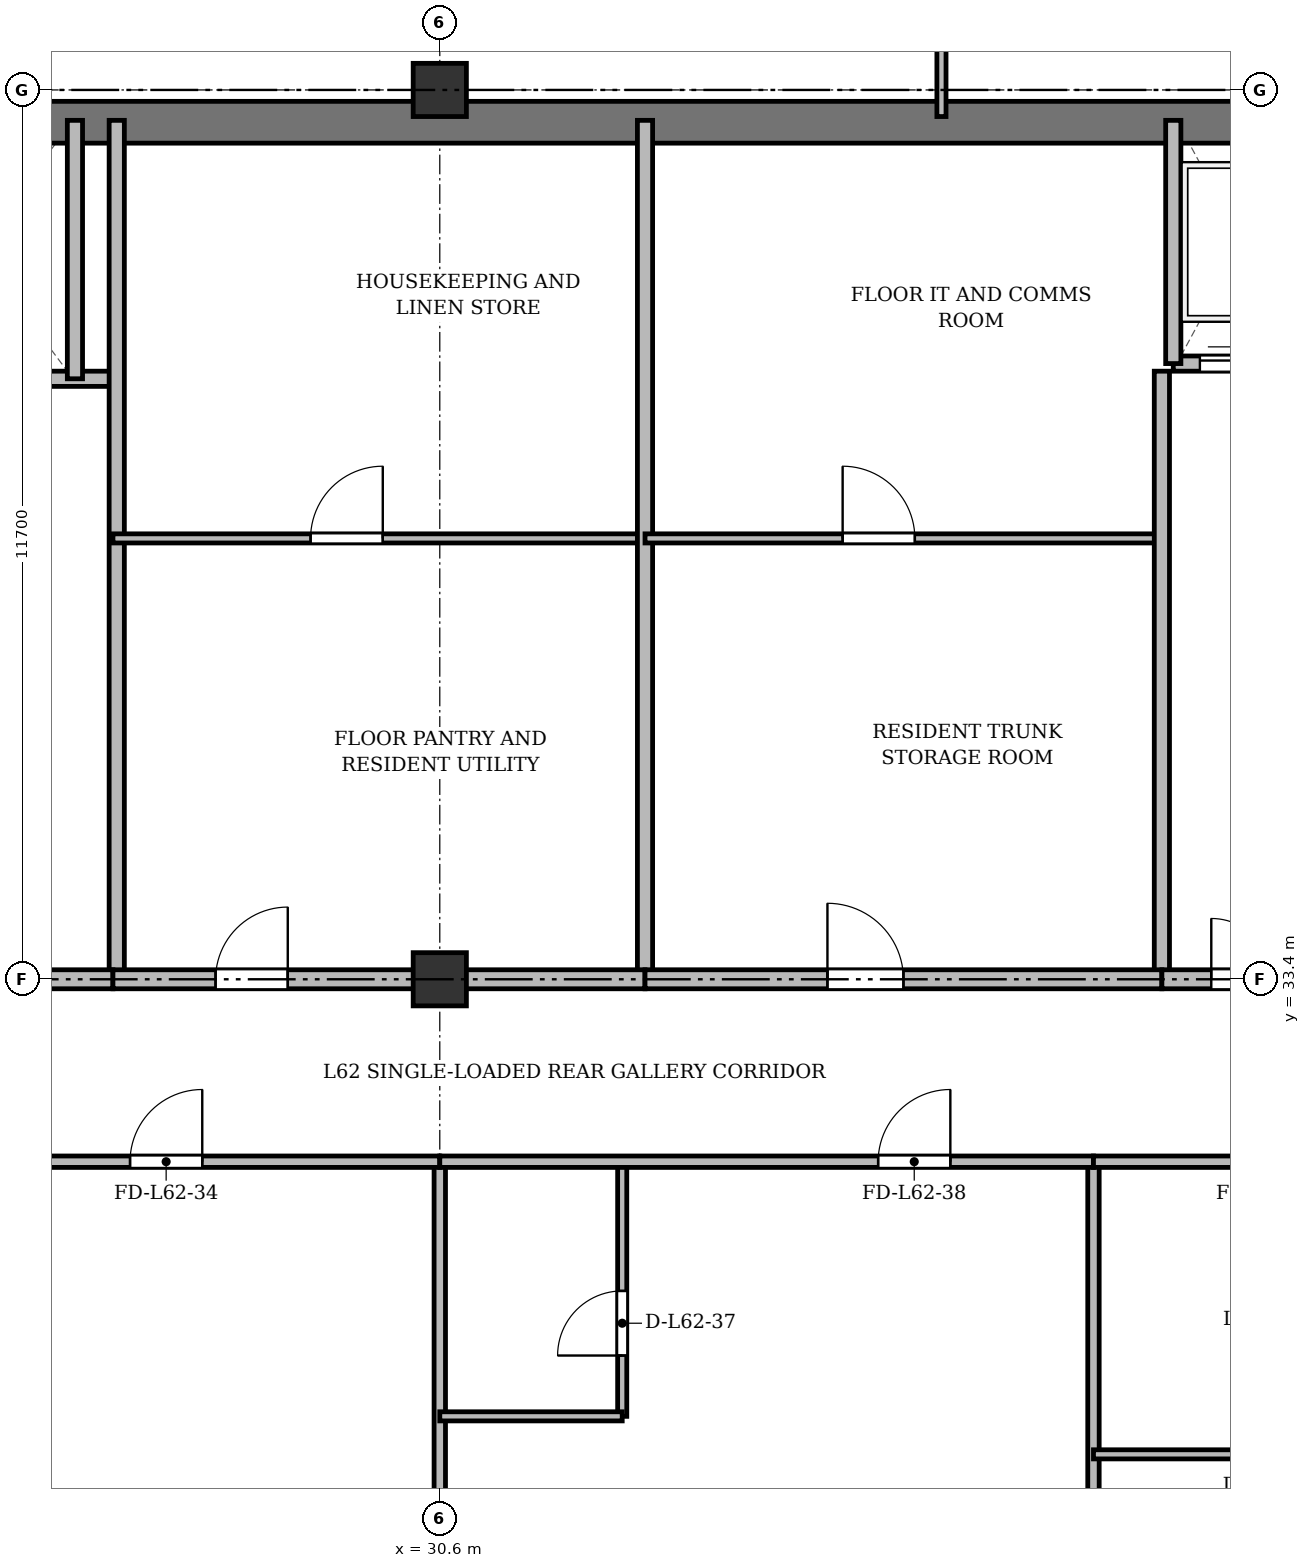
"""IFC4 building model, lengths in metres.
Left out: names, types, materials, properties, quantities, classifications, styles, units other than length and angle.
Written with IfcOpenShell. Run it as: python <this file> out.ifc"""

import sys

from ifc_helpers import new_model, si_unit, direction, frame, frame_2d, origin, origin_2d, place, context, subcontext, project, spatial, rectangle, extrude, source, transform, mapped, element, fill, save


model = new_model("IFC4")
c1 = context("Model", 3, precision=1e-05, world=origin(), true_north=direction((0.0, 1.0)))
c2 = subcontext(c1, "Body", "Model", "MODEL_VIEW")
j1 = project(units=[si_unit("LENGTHUNIT", "METRE"), si_unit("PLANEANGLEUNIT", "RADIAN")], contexts=[c1])
p1 = place(None, origin())
s1 = spatial("IfcSite", under=j1, at=p1, CompositionType="ELEMENT")
p2 = place(p1, origin())
s2 = spatial("IfcBuilding", under=s1, at=p2, CompositionType="ELEMENT")
p3 = place(p2, frame((0.0, 0.0, 237.3)))
s3 = spatial("IfcBuildingStorey", under=s2, at=p3, CompositionType="ELEMENT", Elevation=237.3)
m1 = source(origin(), c2, "Body", "SweptSolid", [
    extrude(rectangle(XDim=0.7, YDim=0.7, at=origin_2d()), origin(), (0.0, 0.0, 1.0), 3.6),
])
for number, where, z_axis, x_axis in (
    (1, (30.6, 33.4, 0.0), (0.0, 0.0, 1.0), (1.0, 0.0, 0.0)),
    (2, (30.6, 45.1, 0.0), (0.0, 0.0, 1.0), (1.0, 0.0, 0.0)),
):
    element("IfcColumn", number, at=place(p3, frame(where, z_axis=z_axis, x_axis=x_axis)), inside=s3, PredefinedType="COLUMN", context=c2, shape_type="MappedRepresentation", body=[
        mapped(m1, transform((0.0, 0.0, 0.0), x_axis=(1.0, 0.0, 0.0), y_axis=(0.0, 1.0, 0.0), z_axis=(0.0, 0.0, 1.0), scale=1.0)),
    ])
p4 = place(p3, frame((15.65, 44.675, 0.0), z_axis=(0.0, 0.0, 1.0), x_axis=(1.0, 0.0, 0.0)))
e3 = element("IfcWall", 3, at=p4, inside=s3, PredefinedType="SHEAR", context=c2, shape_type="SweptSolid", body=[
    extrude(rectangle(XDim=43.1, YDim=0.55, at=frame_2d((21.55, 0.0))), origin(), (0.0, 0.0, 1.0), 3.22),
])
p5 = place(p3, frame((19.55, 41.3, 0.0), z_axis=(0.0, 0.0, 1.0), x_axis=(1.0, 0.0, 0.0)))
e4 = element("IfcWall", 4, at=p5, inside=s3, PredefinedType="SOLIDWALL", context=c2, shape_type="SweptSolid", body=[
    extrude(rectangle(XDim=6.75, YDim=0.2, at=frame_2d((3.375, 0.0))), origin(), (0.0, 0.0, 1.0), 3.22),
])
p6 = place(p5, frame((1.7, 0.0, 0.0)))
e5 = element("IfcOpeningElement", 5, at=p6, cuts=e4, PredefinedType="OPENING", context=c2, shape_type="SweptSolid", body=[
    extrude(rectangle(XDim=1.1, YDim=2.15, at=frame_2d((0.55, 1.075))), frame((0.0, 0.11, 0.0), z_axis=(0.0, -1.0, 0.0), x_axis=(1.0, 0.0, 0.0)), (0.0, 0.0, 1.0), 0.22),
])
p7 = place(p5, frame((4.4, 0.0, 0.0)))
e6 = element("IfcOpeningElement", 6, at=p7, cuts=e4, PredefinedType="OPENING", context=c2, shape_type="SweptSolid", body=[
    extrude(rectangle(XDim=1.1, YDim=2.15, at=frame_2d((0.55, 1.075))), frame((0.0, 0.11, 0.0), z_axis=(0.0, -1.0, 0.0), x_axis=(1.0, 0.0, 0.0)), (0.0, 0.0, 1.0), 0.22),
])
p8 = place(p3, frame((25.8, 41.3, 0.0), z_axis=(0.0, 0.0, 1.0), x_axis=(0.0, 1.0, 0.0)))
e7 = element("IfcWall", 7, at=p8, inside=s3, PredefinedType="SOLIDWALL", context=c2, shape_type="SweptSolid", body=[
    extrude(rectangle(XDim=3.4, YDim=0.2, at=frame_2d((1.7, 0.0))), origin(), (0.0, 0.0, 1.0), 3.22),
])
p9 = place(p3, frame((26.35, 33.4, 0.0), z_axis=(0.0, 0.0, 1.0), x_axis=(0.0, 1.0, 0.0)))
e8 = element("IfcWall", 8, at=p9, inside=s3, PredefinedType="SOLIDWALL", context=c2, shape_type="SweptSolid", body=[
    extrude(rectangle(XDim=11.3, YDim=0.2, at=frame_2d((5.65, 0.0))), origin(), (0.0, 0.0, 1.0), 2.77),
])
p10 = place(p3, frame((19.5, 33.4, 0.0), z_axis=(0.0, 0.0, 1.0), x_axis=(1.0, 0.0, 0.0)))
e9 = element("IfcWall", 9, at=p10, inside=s3, PredefinedType="PARTITIONING", context=c2, shape_type="SweptSolid", body=[
    extrude(rectangle(XDim=6.8, YDim=0.25, at=frame_2d((3.4, 0.0))), origin(), (0.0, 0.0, 1.0), 2.77),
])
p11 = place(p10, frame((0.75, 0.0, 0.0)))
e10 = element("IfcOpeningElement", 10, at=p11, cuts=e9, PredefinedType="OPENING", context=c2, shape_type="SweptSolid", body=[
    extrude(rectangle(XDim=1.6, YDim=2.2, at=frame_2d((0.8, 1.1))), frame((0.0, 0.135, 0.0), z_axis=(0.0, -1.0, 0.0), x_axis=(1.0, 0.0, 0.0)), (0.0, 0.0, 1.0), 0.27),
])
p12 = place(p3, frame((26.3, 39.2, 0.0), z_axis=(0.0, 0.0, 1.0), x_axis=(1.0, 0.0, 0.0)))
e11 = element("IfcWall", 11, at=p12, inside=s3, PredefinedType="PARTITIONING", context=c2, shape_type="SweptSolid", body=[
    extrude(rectangle(XDim=7.0, YDim=0.12, at=frame_2d((3.5, 0.0))), origin(), (0.0, 0.0, 1.0), 2.72),
])
p13 = place(p12, frame((2.6, 0.0, 0.0)))
e12 = element("IfcOpeningElement", 12, at=p13, cuts=e11, PredefinedType="OPENING", context=c2, shape_type="SweptSolid", body=[
    extrude(rectangle(XDim=0.95, YDim=2.15, at=frame_2d((0.475, 1.075))), frame((0.0, 0.07, 0.0), z_axis=(0.0, -1.0, 0.0), x_axis=(1.0, 0.0, 0.0)), (0.0, 0.0, 1.0), 0.14),
])
p14 = place(p3, frame((33.3, 33.4, 0.0), z_axis=(0.0, 0.0, 1.0), x_axis=(0.0, 1.0, 0.0)))
e13 = element("IfcWall", 13, at=p14, inside=s3, PredefinedType="SOLIDWALL", context=c2, shape_type="SweptSolid", body=[
    extrude(rectangle(XDim=11.3, YDim=0.2, at=frame_2d((5.65, 0.0))), origin(), (0.0, 0.0, 1.0), 2.77),
])
p15 = place(p3, frame((33.3, 39.2, 0.0), z_axis=(0.0, 0.0, 1.0), x_axis=(1.0, 0.0, 0.0)))
e14 = element("IfcWall", 14, at=p15, inside=s3, PredefinedType="PARTITIONING", context=c2, shape_type="SweptSolid", body=[
    extrude(rectangle(XDim=6.8, YDim=0.12, at=frame_2d((3.4, 0.0))), origin(), (0.0, 0.0, 1.0), 3.22),
])
p16 = place(p15, frame((2.6, 0.0, 0.0)))
e15 = element("IfcOpeningElement", 15, at=p16, cuts=e14, PredefinedType="OPENING", context=c2, shape_type="SweptSolid", body=[
    extrude(rectangle(XDim=0.95, YDim=2.15, at=frame_2d((0.475, 1.075))), frame((0.0, 0.07, 0.0), z_axis=(0.0, -1.0, 0.0), x_axis=(1.0, 0.0, 0.0)), (0.0, 0.0, 1.0), 0.14),
])
p17 = place(p3, frame((40.1, 33.4, 0.0), z_axis=(0.0, 0.0, 1.0), x_axis=(0.0, 1.0, 0.0)))
e16 = element("IfcWall", 16, at=p17, inside=s3, PredefinedType="SOLIDWALL", context=c2, shape_type="SweptSolid", body=[
    extrude(rectangle(XDim=8.0, YDim=0.2, at=frame_2d((4.0, 0.0))), origin(), (0.0, 0.0, 1.0), 2.77),
])
p18 = place(p3, frame((40.25, 41.5, 0.0), z_axis=(0.0, 0.0, 1.0), x_axis=(1.0, 0.0, 0.0)))
e17 = element("IfcWall", 17, at=p18, inside=s3, PredefinedType="SOLIDWALL", context=c2, shape_type="SweptSolid", body=[
    extrude(rectangle(XDim=6.9, YDim=0.2, at=frame_2d((3.45, 0.0))), origin(), (0.0, 0.0, 1.0), 3.22),
])
p19 = place(p18, frame((0.35, 0.0, 0.0)))
e18 = element("IfcOpeningElement", 18, at=p19, cuts=e17, PredefinedType="OPENING", context=c2, shape_type="SweptSolid", body=[
    extrude(rectangle(XDim=1.05, YDim=2.15, at=frame_2d((0.525, 1.075))), frame((0.0, 0.11, 0.0), z_axis=(0.0, -1.0, 0.0), x_axis=(1.0, 0.0, 0.0)), (0.0, 0.0, 1.0), 0.22),
])
p20 = place(p18, frame((2.05, 0.0, 0.0)))
e19 = element("IfcOpeningElement", 19, at=p20, cuts=e17, PredefinedType="OPENING", context=c2, shape_type="SweptSolid", body=[
    extrude(rectangle(XDim=1.05, YDim=2.15, at=frame_2d((0.525, 1.075))), frame((0.0, 0.11, 0.0), z_axis=(0.0, -1.0, 0.0), x_axis=(1.0, 0.0, 0.0)), (0.0, 0.0, 1.0), 0.22),
])
p21 = place(p18, frame((3.75, 0.0, 0.0)))
e20 = element("IfcOpeningElement", 20, at=p21, cuts=e17, PredefinedType="OPENING", context=c2, shape_type="SweptSolid", body=[
    extrude(rectangle(XDim=1.05, YDim=2.15, at=frame_2d((0.525, 1.075))), frame((0.0, 0.11, 0.0), z_axis=(0.0, -1.0, 0.0), x_axis=(1.0, 0.0, 0.0)), (0.0, 0.0, 1.0), 0.22),
])
p22 = place(p18, frame((5.45, 0.0, 0.0)))
e21 = element("IfcOpeningElement", 21, at=p22, cuts=e17, PredefinedType="OPENING", context=c2, shape_type="SweptSolid", body=[
    extrude(rectangle(XDim=1.05, YDim=2.15, at=frame_2d((0.525, 1.075))), frame((0.0, 0.11, 0.0), z_axis=(0.0, -1.0, 0.0), x_axis=(1.0, 0.0, 0.0)), (0.0, 0.0, 1.0), 0.22),
])
p23 = place(p3, frame((40.25, 41.5, 0.0), z_axis=(0.0, 0.0, 1.0), x_axis=(0.0, 1.0, 0.0)))
e22 = element("IfcWall", 22, at=p23, inside=s3, PredefinedType="SOLIDWALL", context=c2, shape_type="SweptSolid", body=[
    extrude(rectangle(XDim=3.2, YDim=0.2, at=frame_2d((1.6, 0.0))), origin(), (0.0, 0.0, 1.0), 3.22),
])
p24 = place(p3, frame((26.3, 33.4, 0.0), z_axis=(0.0, 0.0, 1.0), x_axis=(1.0, 0.0, 0.0)))
e23 = element("IfcWall", 23, at=p24, inside=s3, PredefinedType="PARTITIONING", context=c2, shape_type="SweptSolid", body=[
    extrude(rectangle(XDim=7.0, YDim=0.25, at=frame_2d((3.5, 0.0))), origin(), (0.0, 0.0, 1.0), 2.77),
])
p25 = place(p24, frame((1.35, 0.0, 0.0)))
e24 = element("IfcOpeningElement", 24, at=p25, cuts=e23, PredefinedType="OPENING", context=c2, shape_type="SweptSolid", body=[
    extrude(rectangle(XDim=0.95, YDim=2.15, at=frame_2d((0.475, 1.075))), frame((0.0, 0.135, 0.0), z_axis=(0.0, -1.0, 0.0), x_axis=(1.0, 0.0, 0.0)), (0.0, 0.0, 1.0), 0.27),
])
p26 = place(p3, frame((33.3, 33.4, 0.0), z_axis=(0.0, 0.0, 1.0), x_axis=(1.0, 0.0, 0.0)))
e25 = element("IfcWall", 25, at=p26, inside=s3, PredefinedType="PARTITIONING", context=c2, shape_type="SweptSolid", body=[
    extrude(rectangle(XDim=6.8, YDim=0.25, at=frame_2d((3.4, 0.0))), origin(), (0.0, 0.0, 1.0), 2.77),
])
p27 = place(p26, frame((2.4, 0.0, 0.0)))
e26 = element("IfcOpeningElement", 26, at=p27, cuts=e25, PredefinedType="OPENING", context=c2, shape_type="SweptSolid", body=[
    extrude(rectangle(XDim=1.0, YDim=2.15, at=frame_2d((0.5, 1.075))), frame((0.0, 0.135, 0.0), z_axis=(0.0, -1.0, 0.0), x_axis=(1.0, 0.0, 0.0)), (0.0, 0.0, 1.0), 0.27),
])
p28 = place(p3, frame((40.1, 33.4, 0.0), z_axis=(0.0, 0.0, 1.0), x_axis=(1.0, 0.0, 0.0)))
e27 = element("IfcWall", 27, at=p28, inside=s3, PredefinedType="PARTITIONING", context=c2, shape_type="SweptSolid", body=[
    extrude(rectangle(XDim=7.05, YDim=0.25, at=frame_2d((3.525, 0.0))), origin(), (0.0, 0.0, 1.0), 2.77),
])
p29 = place(p28, frame((0.65, 0.0, 0.0)))
e28 = element("IfcOpeningElement", 28, at=p29, cuts=e27, PredefinedType="OPENING", context=c2, shape_type="SweptSolid", body=[
    extrude(rectangle(XDim=1.6, YDim=2.2, at=frame_2d((0.8, 1.1))), frame((0.0, 0.135, 0.0), z_axis=(0.0, -1.0, 0.0), x_axis=(1.0, 0.0, 0.0)), (0.0, 0.0, 1.0), 0.27),
])
p30 = place(p3, frame((37.2, 44.75, 0.0), z_axis=(0.0, 0.0, 1.0), x_axis=(0.0, 1.0, 0.0)))
e29 = element("IfcWall", 29, at=p30, inside=s3, PredefinedType="PARTITIONING", context=c2, shape_type="SweptSolid", body=[
    extrude(rectangle(XDim=3.61, YDim=0.12, at=frame_2d((1.805, 0.0))), origin(), (0.0, 0.0, 1.0), 2.77),
])
p31 = place(p30, frame((1.1, 0.0, 0.0)))
e30 = element("IfcOpeningElement", 30, at=p31, cuts=e29, PredefinedType="OPENING", context=c2, shape_type="SweptSolid", body=[
    extrude(rectangle(XDim=0.95, YDim=2.15, at=frame_2d((0.475, 1.075))), frame((0.0, 0.07, 0.0), z_axis=(0.0, -1.0, 0.0), x_axis=(1.0, 0.0, 0.0)), (0.0, 0.0, 1.0), 0.14),
])
p32 = place(p3, frame((30.6, 3.625, 0.0), z_axis=(0.0, 0.0, 1.0), x_axis=(0.0, 1.0, 0.0)))
e31 = element("IfcWall", 31, at=p32, inside=s3, PredefinedType="PARTITIONING", context=c2, shape_type="SweptSolid", body=[
    extrude(rectangle(XDim=27.375, YDim=0.15, at=frame_2d((13.688, 0.0))), origin(), (0.0, 0.0, 1.0), 2.72),
])
p33 = place(p3, frame((39.2, 3.625, 0.0), z_axis=(0.0, 0.0, 1.0), x_axis=(0.0, 1.0, 0.0)))
e32 = element("IfcWall", 32, at=p33, inside=s3, PredefinedType="PARTITIONING", context=c2, shape_type="SweptSolid", body=[
    extrude(rectangle(XDim=27.375, YDim=0.15, at=frame_2d((13.688, 0.0))), origin(), (0.0, 0.0, 1.0), 2.77),
])
p34 = place(p3, frame((23.4, 31.0, 0.0), z_axis=(0.0, 0.0, 1.0), x_axis=(1.0, 0.0, 0.0)))
e33 = element("IfcWall", 33, at=p34, inside=s3, PredefinedType="PARTITIONING", context=c2, shape_type="SweptSolid", body=[
    extrude(rectangle(XDim=7.2, YDim=0.15, at=frame_2d((3.6, 0.0))), origin(), (0.0, 0.0, 1.0), 2.72),
])
p35 = place(p34, frame((3.125, 0.0, 0.0)))
e34 = element("IfcOpeningElement", 34, at=p35, cuts=e33, PredefinedType="OPENING", context=c2, shape_type="SweptSolid", body=[
    extrude(rectangle(XDim=0.95, YDim=2.15, at=frame_2d((0.475, 1.075))), frame((0.0, 0.085, 0.0), z_axis=(0.0, -1.0, 0.0), x_axis=(1.0, 0.0, 0.0)), (0.0, 0.0, 1.0), 0.17),
])
p36 = place(p3, frame((33.0, 27.65, 0.0), z_axis=(0.0, 0.0, 1.0), x_axis=(0.0, 1.0, 0.0)))
e35 = element("IfcWall", 35, at=p36, inside=s3, PredefinedType="PARTITIONING", context=c2, shape_type="SweptSolid", body=[
    extrude(rectangle(XDim=3.35, YDim=0.12, at=frame_2d((1.675, 0.0))), origin(), (0.0, 0.0, 1.0), 3.22),
])
p37 = place(p36, frame((0.8, 0.0, 0.0)))
e36 = element("IfcOpeningElement", 36, at=p37, cuts=e35, PredefinedType="OPENING", context=c2, shape_type="SweptSolid", body=[
    extrude(rectangle(XDim=0.85, YDim=2.1, at=frame_2d((0.425, 1.05))), frame((0.0, 0.07, 0.0), z_axis=(0.0, -1.0, 0.0), x_axis=(1.0, 0.0, 0.0)), (0.0, 0.0, 1.0), 0.14),
])
p38 = place(p3, frame((30.6, 27.65, 0.0), z_axis=(0.0, 0.0, 1.0), x_axis=(1.0, 0.0, 0.0)))
e37 = element("IfcWall", 37, at=p38, inside=s3, PredefinedType="PARTITIONING", context=c2, shape_type="SweptSolid", body=[
    extrude(rectangle(XDim=2.4, YDim=0.12, at=frame_2d((1.2, 0.0))), origin(), (0.0, 0.0, 1.0), 2.72),
])
p39 = place(p3, frame((30.6, 31.0, 0.0), z_axis=(0.0, 0.0, 1.0), x_axis=(1.0, 0.0, 0.0)))
e38 = element("IfcWall", 38, at=p39, inside=s3, PredefinedType="PARTITIONING", context=c2, shape_type="SweptSolid", body=[
    extrude(rectangle(XDim=8.6, YDim=0.15, at=frame_2d((4.3, 0.0))), origin(), (0.0, 0.0, 1.0), 2.72),
])
p40 = place(p39, frame((5.767, 0.0, 0.0)))
e39 = element("IfcOpeningElement", 39, at=p40, cuts=e38, PredefinedType="OPENING", context=c2, shape_type="SweptSolid", body=[
    extrude(rectangle(XDim=0.95, YDim=2.15, at=frame_2d((0.475, 1.075))), frame((0.0, 0.085, 0.0), z_axis=(0.0, -1.0, 0.0), x_axis=(1.0, 0.0, 0.0)), (0.0, 0.0, 1.0), 0.17),
])
p41 = place(p3, frame((39.2, 31.0, 0.0), z_axis=(0.0, 0.0, 1.0), x_axis=(1.0, 0.0, 0.0)))
e40 = element("IfcWall", 40, at=p41, inside=s3, PredefinedType="PARTITIONING", context=c2, shape_type="SweptSolid", body=[
    extrude(rectangle(XDim=4.6, YDim=0.15, at=frame_2d((2.3, 0.0))), origin(), (0.0, 0.0, 1.0), 2.72),
])
p42 = place(p41, frame((1.825, 0.0, 0.0)))
e41 = element("IfcOpeningElement", 41, at=p42, cuts=e40, PredefinedType="OPENING", context=c2, shape_type="SweptSolid", body=[
    extrude(rectangle(XDim=0.95, YDim=2.15, at=frame_2d((0.475, 1.075))), frame((0.0, 0.085, 0.0), z_axis=(0.0, -1.0, 0.0), x_axis=(1.0, 0.0, 0.0)), (0.0, 0.0, 1.0), 0.17),
])
p43 = place(p3, frame((39.2, 27.15, 0.0), z_axis=(0.0, 0.0, 1.0), x_axis=(1.0, 0.0, 0.0)))
e42 = element("IfcWall", 42, at=p43, inside=s3, PredefinedType="PARTITIONING", context=c2, shape_type="SweptSolid", body=[
    extrude(rectangle(XDim=4.6, YDim=0.12, at=frame_2d((2.3, 0.0))), origin(), (0.0, 0.0, 1.0), 2.72),
])
p44 = place(p43, frame((1.825, 0.0, 0.0)))
e43 = element("IfcOpeningElement", 43, at=p44, cuts=e42, PredefinedType="OPENING", context=c2, shape_type="SweptSolid", body=[
    extrude(rectangle(XDim=0.95, YDim=2.15, at=frame_2d((0.475, 1.075))), frame((0.0, 0.07, 0.0), z_axis=(0.0, -1.0, 0.0), x_axis=(1.0, 0.0, 0.0)), (0.0, 0.0, 1.0), 0.14),
])
m2 = source(origin(), c2, "Body", "SweptSolid", [
    extrude(rectangle(XDim=0.95, YDim=2.15, at=frame_2d((0.475, 1.075))), frame((0.0, 0.025, 0.0), z_axis=(0.0, -1.0, 0.0), x_axis=(1.0, 0.0, 0.0)), (0.0, 0.0, 1.0), 0.05),
])
p45 = place(p13, origin())
e44 = element("IfcDoor", 44, at=p45, inside=s3, OperationType="SINGLE_SWING_RIGHT", PredefinedType="DOOR", context=c2, shape_type="MappedRepresentation", body=[
    mapped(m2, transform((0.0, 0.0, 0.0), x_axis=(1.0, 0.0, 0.0), y_axis=(0.0, 1.0, 0.0), z_axis=(0.0, 0.0, 1.0), scale=1.0)),
])
fill(e12, e44)
p46 = place(p16, origin())
e45 = element("IfcDoor", 45, at=p46, inside=s3, OperationType="SINGLE_SWING_LEFT", PredefinedType="DOOR", context=c2, shape_type="MappedRepresentation", body=[
    mapped(m2, transform((0.0, 0.0, 0.0), x_axis=(1.0, 0.0, 0.0), y_axis=(0.0, 1.0, 0.0), z_axis=(0.0, 0.0, 1.0), scale=1.0)),
])
fill(e15, e45)
m3 = source(origin(), c2, "Body", "SweptSolid", [
    extrude(rectangle(XDim=1.05, YDim=2.15, at=frame_2d((0.525, 1.075))), frame((0.0, 0.025, 0.0), z_axis=(0.0, -1.0, 0.0), x_axis=(1.0, 0.0, 0.0)), (0.0, 0.0, 1.0), 0.05),
])
p47 = place(p19, origin())
e46 = element("IfcDoor", 46, at=p47, inside=s3, OperationType="DOUBLE_DOOR_SLIDING", PredefinedType="DOOR", context=c2, shape_type="MappedRepresentation", body=[
    mapped(m3, transform((0.0, 0.0, 0.0), x_axis=(1.0, 0.0, 0.0), y_axis=(0.0, 1.0, 0.0), z_axis=(0.0, 0.0, 1.0), scale=1.0)),
])
fill(e18, e46)
p48 = place(p25, origin())
e47 = element("IfcDoor", 47, at=p48, inside=s3, OperationType="SINGLE_SWING_RIGHT", PredefinedType="DOOR", context=c2, shape_type="MappedRepresentation", body=[
    mapped(m2, transform((0.0, 0.0, 0.0), x_axis=(1.0, 0.0, 0.0), y_axis=(0.0, 1.0, 0.0), z_axis=(0.0, 0.0, 1.0), scale=1.0)),
])
fill(e24, e47)
m4 = source(origin(), c2, "Body", "SweptSolid", [
    extrude(rectangle(XDim=1.0, YDim=2.15, at=frame_2d((0.5, 1.075))), frame((0.0, 0.025, 0.0), z_axis=(0.0, -1.0, 0.0), x_axis=(1.0, 0.0, 0.0)), (0.0, 0.0, 1.0), 0.05),
])
p49 = place(p27, origin())
e48 = element("IfcDoor", 48, at=p49, inside=s3, OperationType="SINGLE_SWING_LEFT", PredefinedType="DOOR", context=c2, shape_type="MappedRepresentation", body=[
    mapped(m4, transform((0.0, 0.0, 0.0), x_axis=(1.0, 0.0, 0.0), y_axis=(0.0, 1.0, 0.0), z_axis=(0.0, 0.0, 1.0), scale=1.0)),
])
fill(e26, e48)
m5 = source(origin(), c2, "Body", "SweptSolid", [
    extrude(rectangle(XDim=1.6, YDim=2.2, at=frame_2d((0.8, 1.1))), frame((0.0, 0.025, 0.0), z_axis=(0.0, -1.0, 0.0), x_axis=(1.0, 0.0, 0.0)), (0.0, 0.0, 1.0), 0.05),
])
p50 = place(p29, origin())
e49 = element("IfcDoor", 49, at=p50, inside=s3, OperationType="DOUBLE_DOOR_SINGLE_SWING", PredefinedType="DOOR", context=c2, shape_type="MappedRepresentation", body=[
    mapped(m5, transform((0.0, 0.0, 0.0), x_axis=(1.0, 0.0, 0.0), y_axis=(0.0, 1.0, 0.0), z_axis=(0.0, 0.0, 1.0), scale=1.0)),
])
fill(e28, e49)
p51 = place(p35, origin())
e50 = element("IfcDoor", 50, at=p51, inside=s3, OperationType="SINGLE_SWING_RIGHT", PredefinedType="DOOR", context=c2, shape_type="MappedRepresentation", body=[
    mapped(m2, transform((0.0, 0.0, 0.0), x_axis=(1.0, 0.0, 0.0), y_axis=(0.0, 1.0, 0.0), z_axis=(0.0, 0.0, 1.0), scale=1.0)),
])
fill(e34, e50)
m6 = source(origin(), c2, "Body", "SweptSolid", [
    extrude(rectangle(XDim=0.85, YDim=2.1, at=frame_2d((0.425, 1.05))), frame((0.0, 0.025, 0.0), z_axis=(0.0, -1.0, 0.0), x_axis=(1.0, 0.0, 0.0)), (0.0, 0.0, 1.0), 0.05),
])
p52 = place(p37, origin())
e51 = element("IfcDoor", 51, at=p52, inside=s3, OperationType="SINGLE_SWING_LEFT", PredefinedType="DOOR", context=c2, shape_type="MappedRepresentation", body=[
    mapped(m6, transform((0.0, 0.0, 0.0), x_axis=(1.0, 0.0, 0.0), y_axis=(0.0, 1.0, 0.0), z_axis=(0.0, 0.0, 1.0), scale=1.0)),
])
fill(e36, e51)
p53 = place(p40, origin())
e52 = element("IfcDoor", 52, at=p53, inside=s3, OperationType="SINGLE_SWING_RIGHT", PredefinedType="DOOR", context=c2, shape_type="MappedRepresentation", body=[
    mapped(m2, transform((0.0, 0.0, 0.0), x_axis=(1.0, 0.0, 0.0), y_axis=(0.0, 1.0, 0.0), z_axis=(0.0, 0.0, 1.0), scale=1.0)),
])
fill(e39, e52)
save(model, sys.argv[1])
